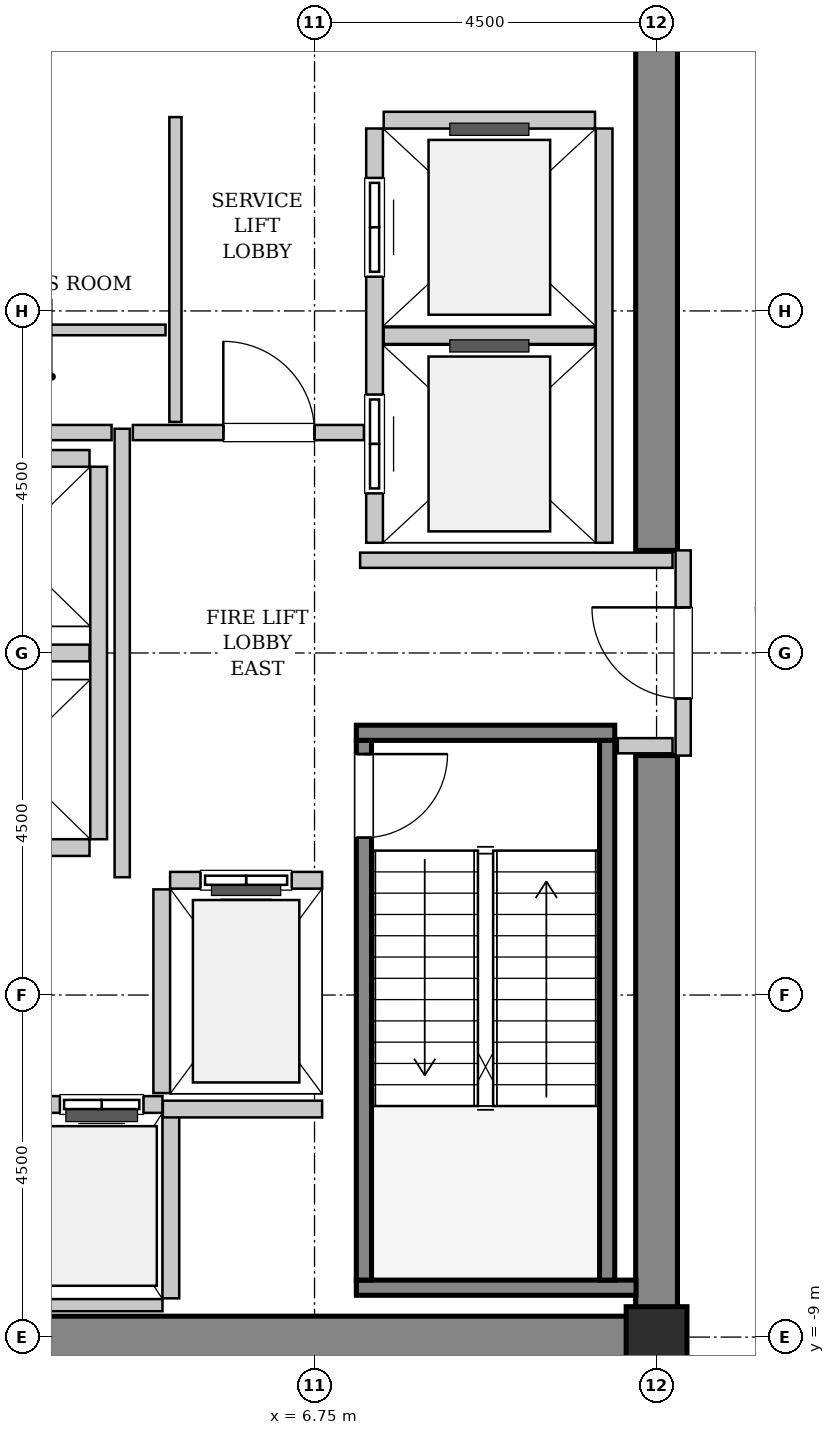
"""IFC4 building model, lengths in metres.
Left out: names, types, materials, properties, quantities, classifications, styles, units other than length and angle.
Written with IfcOpenShell. Run it as: python <this file> out.ifc"""

import sys

from ifc_helpers import new_model, si_unit, direction, frame, frame_2d, origin, origin_2d, place, context, subcontext, project, spatial, rectangle, hollow_rectangle, extrude, source, transform, mapped, element, fill, save


model = new_model("IFC4")
c1 = context("Model", 3, precision=1e-05, world=origin(), true_north=direction((0.0, 1.0)))
c2 = subcontext(c1, "Body", "Model", "MODEL_VIEW")
j1 = project(units=[si_unit("LENGTHUNIT", "METRE"), si_unit("PLANEANGLEUNIT", "RADIAN")], contexts=[c1])
p1 = place(None, origin())
s1 = spatial("IfcSite", under=j1, at=p1, CompositionType="ELEMENT")
p2 = place(p1, origin())
s2 = spatial("IfcBuilding", under=s1, at=p2, CompositionType="ELEMENT")
p3 = place(p2, frame((0.0, 0.0, 202.0)))
s3 = spatial("IfcBuildingStorey", under=s2, at=p3, CompositionType="ELEMENT", Elevation=202.0)
m1 = source(origin(), c2, "Body", "SweptSolid", [
    extrude(rectangle(XDim=9.975, YDim=0.55, at=frame_2d((4.987, 0.0))), origin(), (0.0, 0.0, 1.0), 4.6),
])
p4 = place(p3, frame((1.55, -9.0, 0.0), z_axis=(0.0, 0.0, 1.0), x_axis=(1.0, 0.0, 0.0)))
e1 = element("IfcWall", 1, at=p4, inside=s3, PredefinedType="SHEAR", context=c2, shape_type="MappedRepresentation", body=[
    mapped(m1, transform((0.0, 0.0, 0.0), x_axis=(1.0, 0.0, 0.0), y_axis=(0.0, 1.0, 0.0), z_axis=(0.0, 0.0, 1.0), scale=1.0)),
])
m2 = source(origin(), c2, "Body", "SweptSolid", [
    extrude(rectangle(XDim=7.375, YDim=0.55, at=frame_2d((3.688, 0.0))), origin(), (0.0, 0.0, 1.0), 4.6),
])
for number, where, z_axis, x_axis in (
    (2, (11.25, -8.725, 0.0), (0.0, 0.0, 1.0), (0.0, 1.0, 0.0)),
    (3, (11.25, 1.35, 0.0), (0.0, 0.0, 1.0), (0.0, 1.0, 0.0)),
):
    element("IfcWall", number, at=place(p3, frame(where, z_axis=z_axis, x_axis=x_axis)), inside=s3, PredefinedType="SHEAR", context=c2, shape_type="MappedRepresentation", body=[
        mapped(m2, transform((0.0, 0.0, 0.0), x_axis=(1.0, 0.0, 0.0), y_axis=(0.0, 1.0, 0.0), z_axis=(0.0, 0.0, 1.0), scale=1.0)),
    ])
m3 = source(origin(), c2, "Body", "SweptSolid", [
    extrude(hollow_rectangle(XDim=0.8, YDim=0.8, WallThickness=0.04, InnerFilletRadius=0.04, OuterFilletRadius=0.08, at=origin_2d()), origin(), (0.0, 0.0, 1.0), 4.6),
])
p5 = place(p3, frame((11.25, -9.0, 0.0), z_axis=(0.0, 0.0, 1.0), x_axis=(1.0, 0.0, 0.0)))
e4 = element("IfcColumn", 4, at=p5, inside=s3, PredefinedType="COLUMN", context=c2, shape_type="MappedRepresentation", body=[
    mapped(m3, transform((0.0, 0.0, 0.0), x_axis=(1.0, 0.0, 0.0), y_axis=(0.0, 1.0, 0.0), z_axis=(0.0, 0.0, 1.0), scale=1.0)),
])
m4 = source(origin(), c2, "Body", "SweptSolid", [
    extrude(rectangle(XDim=3.4, YDim=0.2, at=frame_2d((1.7, 0.0))), origin(), (0.0, 0.0, 1.0), 4.6),
])
p6 = place(p3, frame((7.3, -1.05, 0.0), z_axis=(0.0, 0.0, 1.0), x_axis=(1.0, 0.0, 0.0)))
e5 = element("IfcWall", 5, at=p6, inside=s3, PredefinedType="SOLIDWALL", context=c2, shape_type="MappedRepresentation", body=[
    mapped(m4, transform((0.0, 0.0, 0.0), x_axis=(1.0, 0.0, 0.0), y_axis=(0.0, 1.0, 0.0), z_axis=(0.0, 0.0, 1.0), scale=1.0)),
])
m5 = source(origin(), c2, "Body", "SweptSolid", [
    extrude(rectangle(XDim=3.68, YDim=0.2, at=frame_2d((1.84, 0.0))), origin(), (0.0, 0.0, 1.0), 4.6),
])
p7 = place(p3, frame((7.3, -8.35, 0.0), z_axis=(0.0, 0.0, 1.0), x_axis=(1.0, 0.0, 0.0)))
e6 = element("IfcWall", 6, at=p7, inside=s3, PredefinedType="SOLIDWALL", context=c2, shape_type="MappedRepresentation", body=[
    mapped(m5, transform((0.0, 0.0, 0.0), x_axis=(1.0, 0.0, 0.0), y_axis=(0.0, 1.0, 0.0), z_axis=(0.0, 0.0, 1.0), scale=1.0)),
])
m6 = source(origin(), c2, "Body", "SweptSolid", [
    extrude(rectangle(XDim=7.1, YDim=0.2, at=frame_2d((3.55, 0.0))), origin(), (0.0, 0.0, 1.0), 4.6),
])
p8 = place(p3, frame((7.4, -1.15, 0.0), z_axis=(0.0, 0.0, 1.0), x_axis=(0.0, -1.0, 0.0)))
e7 = element("IfcWall", 7, at=p8, inside=s3, PredefinedType="SOLIDWALL", context=c2, shape_type="MappedRepresentation", body=[
    mapped(m6, transform((0.0, 0.0, 0.0), x_axis=(1.0, 0.0, 0.0), y_axis=(0.0, 1.0, 0.0), z_axis=(0.0, 0.0, 1.0), scale=1.0)),
])
p9 = place(p8, frame((0.18, 0.0, 0.0)))
e8 = element("IfcOpeningElement", 8, at=p9, cuts=e7, PredefinedType="OPENING", context=c2, shape_type="SweptSolid", body=[
    extrude(rectangle(XDim=1.1, YDim=2.15, at=frame_2d((0.55, 1.075))), frame((0.0, 0.11, 0.0), z_axis=(0.0, -1.0, 0.0), x_axis=(1.0, 0.0, 0.0)), (0.0, 0.0, 1.0), 0.22),
])
p10 = place(p3, frame((10.6, -1.15, 0.0), z_axis=(0.0, 0.0, 1.0), x_axis=(0.0, -1.0, 0.0)))
e9 = element("IfcWall", 9, at=p10, inside=s3, PredefinedType="SOLIDWALL", context=c2, shape_type="MappedRepresentation", body=[
    mapped(m6, transform((0.0, 0.0, 0.0), x_axis=(1.0, 0.0, 0.0), y_axis=(0.0, 1.0, 0.0), z_axis=(0.0, 0.0, 1.0), scale=1.0)),
])
m7 = source(origin(), c2, "Body", "SweptSolid", [
    extrude(rectangle(XDim=2.0, YDim=0.22, at=frame_2d((1.0, 0.0))), origin(), (0.0, 0.0, 1.0), 4.335),
])
p11 = place(p3, frame((6.85, -2.99, 0.0), z_axis=(0.0, 0.0, 1.0), x_axis=(-1.0, 0.0, 0.0)))
e10 = element("IfcWall", 10, at=p11, inside=s3, PredefinedType="SOLIDWALL", context=c2, shape_type="MappedRepresentation", body=[
    mapped(m7, transform((0.0, 0.0, 0.0), x_axis=(1.0, 0.0, 0.0), y_axis=(0.0, 1.0, 0.0), z_axis=(0.0, 0.0, 1.0), scale=1.0)),
])
p12 = place(p11, frame((0.4, 0.0, 0.0)))
e11 = element("IfcOpeningElement", 11, at=p12, cuts=e10, PredefinedType="OPENING", context=c2, shape_type="SweptSolid", body=[
    extrude(rectangle(XDim=1.2, YDim=2.2, at=frame_2d((0.6, 1.1))), frame((0.0, 0.12, 0.0), z_axis=(0.0, -1.0, 0.0), x_axis=(1.0, 0.0, 0.0)), (0.0, 0.0, 1.0), 0.24),
])
m8 = source(origin(), c2, "Body", "SweptSolid", [
    extrude(rectangle(XDim=2.68, YDim=0.22, at=frame_2d((1.34, 0.0))), origin(), (0.0, 0.0, 1.0), 4.335),
])
p13 = place(p3, frame((4.74, -3.11, 0.0), z_axis=(0.0, 0.0, 1.0), x_axis=(0.0, -1.0, 0.0)))
e12 = element("IfcWall", 12, at=p13, inside=s3, PredefinedType="SOLIDWALL", context=c2, shape_type="MappedRepresentation", body=[
    mapped(m8, transform((0.0, 0.0, 0.0), x_axis=(1.0, 0.0, 0.0), y_axis=(0.0, 1.0, 0.0), z_axis=(0.0, 0.0, 1.0), scale=1.0)),
])
m9 = source(origin(), c2, "Body", "SweptSolid", [
    extrude(rectangle(XDim=5.45, YDim=0.22, at=frame_2d((2.725, 0.0))), origin(), (0.0, 0.0, 1.0), 4.335),
])
p14 = place(p3, frame((7.54, 6.9, 0.0), z_axis=(0.0, 0.0, 1.0), x_axis=(0.0, -1.0, 0.0)))
e13 = element("IfcWall", 13, at=p14, inside=s3, PredefinedType="SOLIDWALL", context=c2, shape_type="MappedRepresentation", body=[
    mapped(m9, transform((0.0, 0.0, 0.0), x_axis=(1.0, 0.0, 0.0), y_axis=(0.0, 1.0, 0.0), z_axis=(0.0, 0.0, 1.0), scale=1.0)),
])
p15 = place(p14, frame((3.5, 0.0, 0.0)))
e14 = element("IfcOpeningElement", 14, at=p15, cuts=e13, PredefinedType="OPENING", context=c2, shape_type="SweptSolid", body=[
    extrude(rectangle(XDim=1.3, YDim=2.3, at=frame_2d((0.65, 1.15))), frame((0.0, 0.12, 0.0), z_axis=(0.0, -1.0, 0.0), x_axis=(1.0, 0.0, 0.0)), (0.0, 0.0, 1.0), 0.24),
])
p16 = place(p14, frame((0.65, 0.0, 0.0)))
e15 = element("IfcOpeningElement", 15, at=p16, cuts=e13, PredefinedType="OPENING", context=c2, shape_type="SweptSolid", body=[
    extrude(rectangle(XDim=1.3, YDim=2.3, at=frame_2d((0.65, 1.15))), frame((0.0, 0.12, 0.0), z_axis=(0.0, -1.0, 0.0), x_axis=(1.0, 0.0, 0.0)), (0.0, 0.0, 1.0), 0.24),
])
p17 = place(p3, frame((10.56, 1.45, 0.0), z_axis=(0.0, 0.0, 1.0), x_axis=(0.0, 1.0, 0.0)))
e16 = element("IfcWall", 16, at=p17, inside=s3, PredefinedType="SOLIDWALL", context=c2, shape_type="MappedRepresentation", body=[
    mapped(m9, transform((0.0, 0.0, 0.0), x_axis=(1.0, 0.0, 0.0), y_axis=(0.0, 1.0, 0.0), z_axis=(0.0, 0.0, 1.0), scale=1.0)),
])
m10 = source(origin(), c2, "Body", "SweptSolid", [
    extrude(rectangle(XDim=2.78, YDim=0.22, at=frame_2d((1.39, 0.0))), origin(), (0.0, 0.0, 1.0), 4.335),
])
for number, where, z_axis, x_axis in (
    (17, (7.66, 4.175, 0.0), (0.0, 0.0, 1.0), (1.0, 0.0, 0.0)),
    (18, (10.44, 7.01, 0.0), (0.0, 0.0, 1.0), (-1.0, 0.0, 0.0)),
):
    element("IfcWall", number, at=place(p3, frame(where, z_axis=z_axis, x_axis=x_axis)), inside=s3, PredefinedType="SOLIDWALL", context=c2, shape_type="MappedRepresentation", body=[
        mapped(m10, transform((0.0, 0.0, 0.0), x_axis=(1.0, 0.0, 0.0), y_axis=(0.0, 1.0, 0.0), z_axis=(0.0, 0.0, 1.0), scale=1.0)),
    ])
m11 = source(origin(), c2, "Body", "SweptSolid", [
    extrude(rectangle(XDim=3.2, YDim=0.22, at=frame_2d((1.6, 0.0))), origin(), (0.0, 0.0, 1.0), 4.335),
])
p18 = place(p3, frame((4.75, -5.94, 0.0), z_axis=(0.0, 0.0, 1.0), x_axis=(-1.0, 0.0, 0.0)))
e19 = element("IfcWall", 19, at=p18, inside=s3, PredefinedType="SOLIDWALL", context=c2, shape_type="MappedRepresentation", body=[
    mapped(m11, transform((0.0, 0.0, 0.0), x_axis=(1.0, 0.0, 0.0), y_axis=(0.0, 1.0, 0.0), z_axis=(0.0, 0.0, 1.0), scale=1.0)),
])
p19 = place(p18, frame((1.875, 0.0, 0.0)))
e20 = element("IfcOpeningElement", 20, at=p19, cuts=e19, PredefinedType="OPENING", context=c2, shape_type="SweptSolid", body=[
    extrude(rectangle(XDim=1.1, YDim=2.2, at=frame_2d((0.55, 1.1))), frame((0.0, 0.12, 0.0), z_axis=(0.0, -1.0, 0.0), x_axis=(1.0, 0.0, 0.0)), (0.0, 0.0, 1.0), 0.24),
])
p20 = place(p18, frame((0.25, 0.0, 0.0)))
e21 = element("IfcOpeningElement", 21, at=p20, cuts=e19, PredefinedType="OPENING", context=c2, shape_type="SweptSolid", body=[
    extrude(rectangle(XDim=1.1, YDim=2.2, at=frame_2d((0.55, 1.1))), frame((0.0, 0.12, 0.0), z_axis=(0.0, -1.0, 0.0), x_axis=(1.0, 0.0, 0.0)), (0.0, 0.0, 1.0), 0.24),
])
m12 = source(origin(), c2, "Body", "SweptSolid", [
    extrude(rectangle(XDim=3.2, YDim=0.16, at=frame_2d((1.6, 0.0))), origin(), (0.0, 0.0, 1.0), 3.225),
])
p21 = place(p3, frame((1.55, -8.58, 0.0), z_axis=(0.0, 0.0, 1.0), x_axis=(1.0, 0.0, 0.0)))
e22 = element("IfcWall", 22, at=p21, inside=s3, PredefinedType="PARTITIONING", context=c2, shape_type="MappedRepresentation", body=[
    mapped(m12, transform((0.0, 0.0, 0.0), x_axis=(1.0, 0.0, 0.0), y_axis=(0.0, 1.0, 0.0), z_axis=(0.0, 0.0, 1.0), scale=1.0)),
])
m13 = source(origin(), c2, "Body", "SweptSolid", [
    extrude(rectangle(XDim=2.43, YDim=0.22, at=frame_2d((1.215, 0.0))), origin(), (0.0, 0.0, 1.0), 4.335),
])
p22 = place(p3, frame((4.86, -8.49, 0.0), z_axis=(0.0, 0.0, 1.0), x_axis=(0.0, 1.0, 0.0)))
e23 = element("IfcWall", 23, at=p22, inside=s3, PredefinedType="SOLIDWALL", context=c2, shape_type="MappedRepresentation", body=[
    mapped(m13, transform((0.0, 0.0, 0.0), x_axis=(1.0, 0.0, 0.0), y_axis=(0.0, 1.0, 0.0), z_axis=(0.0, 0.0, 1.0), scale=1.0)),
])
m14 = source(origin(), c2, "Body", "SweptSolid", [
    extrude(rectangle(XDim=4.9, YDim=0.22, at=frame_2d((2.45, 0.0))), origin(), (0.0, 0.0, 1.0), 4.335),
])
p23 = place(p3, frame((3.91, -2.45, 0.0), z_axis=(0.0, 0.0, 1.0), x_axis=(0.0, 1.0, 0.0)))
e24 = element("IfcWall", 24, at=p23, inside=s3, PredefinedType="SOLIDWALL", context=c2, shape_type="MappedRepresentation", body=[
    mapped(m14, transform((0.0, 0.0, 0.0), x_axis=(1.0, 0.0, 0.0), y_axis=(0.0, 1.0, 0.0), z_axis=(0.0, 0.0, 1.0), scale=1.0)),
])
m15 = source(origin(), c2, "Body", "SweptSolid", [
    extrude(rectangle(XDim=2.13, YDim=0.22, at=frame_2d((1.065, 0.0))), origin(), (0.0, 0.0, 1.0), 4.335),
])
for number, where, z_axis, x_axis in (
    (25, (1.66, -2.56, 0.0), (0.0, 0.0, 1.0), (1.0, 0.0, 0.0)),
    (26, (1.66, 0.0, 0.0), (0.0, 0.0, 1.0), (1.0, 0.0, 0.0)),
    (27, (3.79, 2.56, 0.0), (0.0, 0.0, 1.0), (-1.0, 0.0, 0.0)),
):
    element("IfcWall", number, at=place(p3, frame(where, z_axis=z_axis, x_axis=x_axis)), inside=s3, PredefinedType="SOLIDWALL", context=c2, shape_type="MappedRepresentation", body=[
        mapped(m15, transform((0.0, 0.0, 0.0), x_axis=(1.0, 0.0, 0.0), y_axis=(0.0, 1.0, 0.0), z_axis=(0.0, 0.0, 1.0), scale=1.0)),
    ])
m16 = source(origin(), c2, "Body", "SweptSolid", [
    extrude(rectangle(XDim=2.095, YDim=0.22, at=frame_2d((1.048, 0.0))), origin(), (0.0, 0.0, 1.0), 4.335),
])
p24 = place(p3, frame((4.755, -6.0, 0.0), z_axis=(0.0, 0.0, 1.0), x_axis=(1.0, 0.0, 0.0)))
e28 = element("IfcWall", 28, at=p24, inside=s3, PredefinedType="SOLIDWALL", context=c2, shape_type="MappedRepresentation", body=[
    mapped(m16, transform((0.0, 0.0, 0.0), x_axis=(1.0, 0.0, 0.0), y_axis=(0.0, 1.0, 0.0), z_axis=(0.0, 0.0, 1.0), scale=1.0)),
])
m17 = source(origin(), c2, "Body", "SweptSolid", [
    extrude(rectangle(XDim=2.7, YDim=0.2, at=frame_2d((1.35, 0.0))), origin(), (0.0, 0.0, 1.0), 3.225),
])
p25 = place(p3, frame((11.6, -1.35, 0.0), z_axis=(0.0, 0.0, 1.0), x_axis=(0.0, 1.0, 0.0)))
e29 = element("IfcWall", 29, at=p25, inside=s3, PredefinedType="PARTITIONING", context=c2, shape_type="MappedRepresentation", body=[
    mapped(m17, transform((0.0, 0.0, 0.0), x_axis=(1.0, 0.0, 0.0), y_axis=(0.0, 1.0, 0.0), z_axis=(0.0, 0.0, 1.0), scale=1.0)),
])
p26 = place(p25, frame((0.75, 0.0, 0.0)))
e30 = element("IfcOpeningElement", 30, at=p26, cuts=e29, PredefinedType="OPENING", context=c2, shape_type="SweptSolid", body=[
    extrude(rectangle(XDim=1.2, YDim=2.15, at=frame_2d((0.6, 1.075))), frame((0.0, 0.11, 0.0), z_axis=(0.0, -1.0, 0.0), x_axis=(1.0, 0.0, 0.0)), (0.0, 0.0, 1.0), 0.22),
])
m18 = source(origin(), c2, "Body", "SweptSolid", [
    extrude(rectangle(XDim=5.9, YDim=0.2, at=frame_2d((2.95, 0.0))), origin(), (0.0, 0.0, 1.0), 4.335),
])
p27 = place(p3, frame((4.22, -2.95, 0.0), z_axis=(0.0, 0.0, 1.0), x_axis=(0.0, 1.0, 0.0)))
e31 = element("IfcWall", 31, at=p27, inside=s3, PredefinedType="PARTITIONING", context=c2, shape_type="MappedRepresentation", body=[
    mapped(m18, transform((0.0, 0.0, 0.0), x_axis=(1.0, 0.0, 0.0), y_axis=(0.0, 1.0, 0.0), z_axis=(0.0, 0.0, 1.0), scale=1.0)),
])
m19 = source(origin(), c2, "Body", "SweptSolid", [
    extrude(rectangle(XDim=2.52, YDim=0.2, at=frame_2d((1.26, 0.0))), origin(), (0.0, 0.0, 1.0), 4.335),
])
p28 = place(p3, frame((1.56, 2.9, 0.0), z_axis=(0.0, 0.0, 1.0), x_axis=(1.0, 0.0, 0.0)))
e32 = element("IfcWall", 32, at=p28, inside=s3, PredefinedType="PARTITIONING", context=c2, shape_type="MappedRepresentation", body=[
    mapped(m19, transform((0.0, 0.0, 0.0), x_axis=(1.0, 0.0, 0.0), y_axis=(0.0, 1.0, 0.0), z_axis=(0.0, 0.0, 1.0), scale=1.0)),
])
m20 = source(origin(), c2, "Body", "SweptSolid", [
    extrude(rectangle(XDim=3.04, YDim=0.2, at=frame_2d((1.52, 0.0))), origin(), (0.0, 0.0, 1.0), 4.335),
])
p29 = place(p3, frame((4.36, 2.9, 0.0), z_axis=(0.0, 0.0, 1.0), x_axis=(1.0, 0.0, 0.0)))
e33 = element("IfcWall", 33, at=p29, inside=s3, PredefinedType="PARTITIONING", context=c2, shape_type="MappedRepresentation", body=[
    mapped(m20, transform((0.0, 0.0, 0.0), x_axis=(1.0, 0.0, 0.0), y_axis=(0.0, 1.0, 0.0), z_axis=(0.0, 0.0, 1.0), scale=1.0)),
])
p30 = place(p29, frame((1.19, 0.0, 0.0)))
e34 = element("IfcOpeningElement", 34, at=p30, cuts=e33, PredefinedType="OPENING", context=c2, shape_type="SweptSolid", body=[
    extrude(rectangle(XDim=1.2, YDim=2.15, at=frame_2d((0.6, 1.075))), frame((0.0, 0.11, 0.0), z_axis=(0.0, -1.0, 0.0), x_axis=(1.0, 0.0, 0.0)), (0.0, 0.0, 1.0), 0.22),
])
m21 = source(origin(), c2, "Body", "SweptSolid", [
    extrude(rectangle(XDim=4.11, YDim=0.2, at=frame_2d((2.055, 0.0))), origin(), (0.0, 0.0, 1.0), 4.335),
])
p31 = place(p3, frame((7.35, 1.22, 0.0), z_axis=(0.0, 0.0, 1.0), x_axis=(1.0, 0.0, 0.0)))
e35 = element("IfcWall", 35, at=p31, inside=s3, PredefinedType="PARTITIONING", context=c2, shape_type="MappedRepresentation", body=[
    mapped(m21, transform((0.0, 0.0, 0.0), x_axis=(1.0, 0.0, 0.0), y_axis=(0.0, 1.0, 0.0), z_axis=(0.0, 0.0, 1.0), scale=1.0)),
])
m22 = source(origin(), c2, "Body", "SweptSolid", [
    extrude(rectangle(XDim=0.72, YDim=0.2, at=frame_2d((0.36, 0.0))), origin(), (0.0, 0.0, 1.0), 4.335),
])
p32 = place(p3, frame((10.74, -1.22, 0.0), z_axis=(0.0, 0.0, 1.0), x_axis=(1.0, 0.0, 0.0)))
e36 = element("IfcWall", 36, at=p32, inside=s3, PredefinedType="PARTITIONING", context=c2, shape_type="MappedRepresentation", body=[
    mapped(m22, transform((0.0, 0.0, 0.0), x_axis=(1.0, 0.0, 0.0), y_axis=(0.0, 1.0, 0.0), z_axis=(0.0, 0.0, 1.0), scale=1.0)),
])
m23 = source(origin(), c2, "Body", "SweptSolid", [
    extrude(rectangle(XDim=4.01, YDim=0.16, at=frame_2d((2.005, 0.0))), origin(), (0.0, 0.0, 1.0), 4.335),
])
p33 = place(p3, frame((4.92, 3.04, 0.0), z_axis=(0.0, 0.0, 1.0), x_axis=(0.0, 1.0, 0.0)))
e37 = element("IfcWall", 37, at=p33, inside=s3, PredefinedType="PARTITIONING", context=c2, shape_type="MappedRepresentation", body=[
    mapped(m23, transform((0.0, 0.0, 0.0), x_axis=(1.0, 0.0, 0.0), y_axis=(0.0, 1.0, 0.0), z_axis=(0.0, 0.0, 1.0), scale=1.0)),
])
m24 = source(origin(), c2, "Body", "SweptSolid", [
    extrude(rectangle(XDim=3.15, YDim=0.14, at=frame_2d((1.575, 0.0))), origin(), (0.0, 0.0, 1.0), 4.335),
])
p34 = place(p3, frame((1.64, 4.25, 0.0), z_axis=(0.0, 0.0, 1.0), x_axis=(1.0, 0.0, 0.0)))
e38 = element("IfcWall", 38, at=p34, inside=s3, PredefinedType="PARTITIONING", context=c2, shape_type="MappedRepresentation", body=[
    mapped(m24, transform((0.0, 0.0, 0.0), x_axis=(1.0, 0.0, 0.0), y_axis=(0.0, 1.0, 0.0), z_axis=(0.0, 0.0, 1.0), scale=1.0)),
])
m25 = source(origin(), c2, "Body", "SweptSolid", [
    extrude(rectangle(XDim=1.1, YDim=2.15, at=frame_2d((0.55, 1.075))), frame((0.0, 0.025, 0.0), z_axis=(0.0, -1.0, 0.0), x_axis=(1.0, 0.0, 0.0)), (0.0, 0.0, 1.0), 0.05),
])
p35 = place(p9, origin())
e39 = element("IfcDoor", 39, at=p35, inside=s3, OperationType="SINGLE_SWING_LEFT", PredefinedType="DOOR", context=c2, shape_type="MappedRepresentation", body=[
    mapped(m25, transform((0.0, 0.0, 0.0), x_axis=(1.0, 0.0, 0.0), y_axis=(0.0, 1.0, 0.0), z_axis=(0.0, 0.0, 1.0), scale=1.0)),
])
fill(e8, e39)
m26 = source(origin(), c2, "Body", "SweptSolid", [
    extrude(rectangle(XDim=1.2, YDim=2.2, at=frame_2d((0.6, 1.1))), frame((0.0, 0.025, 0.0), z_axis=(0.0, -1.0, 0.0), x_axis=(1.0, 0.0, 0.0)), (0.0, 0.0, 1.0), 0.05),
])
p36 = place(p12, origin())
e40 = element("IfcDoor", 40, at=p36, inside=s3, OperationType="SLIDING_TO_LEFT", PredefinedType="DOOR", context=c2, shape_type="MappedRepresentation", body=[
    mapped(m26, transform((0.0, 0.0, 0.0), x_axis=(1.0, 0.0, 0.0), y_axis=(0.0, 1.0, 0.0), z_axis=(0.0, 0.0, 1.0), scale=1.0)),
])
fill(e11, e40)
m27 = source(origin(), c2, "Body", "SweptSolid", [
    extrude(rectangle(XDim=1.3, YDim=2.3, at=frame_2d((0.65, 1.15))), frame((0.0, 0.025, 0.0), z_axis=(0.0, -1.0, 0.0), x_axis=(1.0, 0.0, 0.0)), (0.0, 0.0, 1.0), 0.05),
])
p37 = place(p15, origin())
e41 = element("IfcDoor", 41, at=p37, inside=s3, OperationType="SLIDING_TO_RIGHT", PredefinedType="DOOR", context=c2, shape_type="MappedRepresentation", body=[
    mapped(m27, transform((0.0, 0.0, 0.0), x_axis=(1.0, 0.0, 0.0), y_axis=(0.0, 1.0, 0.0), z_axis=(0.0, 0.0, 1.0), scale=1.0)),
])
fill(e14, e41)
p38 = place(p16, origin())
e42 = element("IfcDoor", 42, at=p38, inside=s3, OperationType="SLIDING_TO_RIGHT", PredefinedType="DOOR", context=c2, shape_type="MappedRepresentation", body=[
    mapped(m27, transform((0.0, 0.0, 0.0), x_axis=(1.0, 0.0, 0.0), y_axis=(0.0, 1.0, 0.0), z_axis=(0.0, 0.0, 1.0), scale=1.0)),
])
fill(e15, e42)
m28 = source(origin(), c2, "Body", "SweptSolid", [
    extrude(rectangle(XDim=1.1, YDim=2.2, at=frame_2d((0.55, 1.1))), frame((0.0, 0.025, 0.0), z_axis=(0.0, -1.0, 0.0), x_axis=(1.0, 0.0, 0.0)), (0.0, 0.0, 1.0), 0.05),
])
p39 = place(p20, origin())
e43 = element("IfcDoor", 43, at=p39, inside=s3, OperationType="DOUBLE_DOOR_SLIDING", PredefinedType="DOOR", context=c2, shape_type="MappedRepresentation", body=[
    mapped(m28, transform((0.0, 0.0, 0.0), x_axis=(1.0, 0.0, 0.0), y_axis=(0.0, 1.0, 0.0), z_axis=(0.0, 0.0, 1.0), scale=1.0)),
])
fill(e21, e43)
m29 = source(origin(), c2, "Body", "SweptSolid", [
    extrude(rectangle(XDim=1.2, YDim=2.15, at=frame_2d((0.6, 1.075))), frame((0.0, 0.025, 0.0), z_axis=(0.0, -1.0, 0.0), x_axis=(1.0, 0.0, 0.0)), (0.0, 0.0, 1.0), 0.05),
])
p40 = place(p26, origin())
e44 = element("IfcDoor", 44, at=p40, inside=s3, OperationType="SINGLE_SWING_RIGHT", PredefinedType="DOOR", context=c2, shape_type="MappedRepresentation", body=[
    mapped(m29, transform((0.0, 0.0, 0.0), x_axis=(1.0, 0.0, 0.0), y_axis=(0.0, 1.0, 0.0), z_axis=(0.0, 0.0, 1.0), scale=1.0)),
])
fill(e30, e44)
p41 = place(p30, origin())
e45 = element("IfcDoor", 45, at=p41, inside=s3, OperationType="SINGLE_SWING_LEFT", PredefinedType="DOOR", context=c2, shape_type="MappedRepresentation", body=[
    mapped(m29, transform((0.0, 0.0, 0.0), x_axis=(1.0, 0.0, 0.0), y_axis=(0.0, 1.0, 0.0), z_axis=(0.0, 0.0, 1.0), scale=1.0)),
])
fill(e34, e45)
save(model, sys.argv[1])
